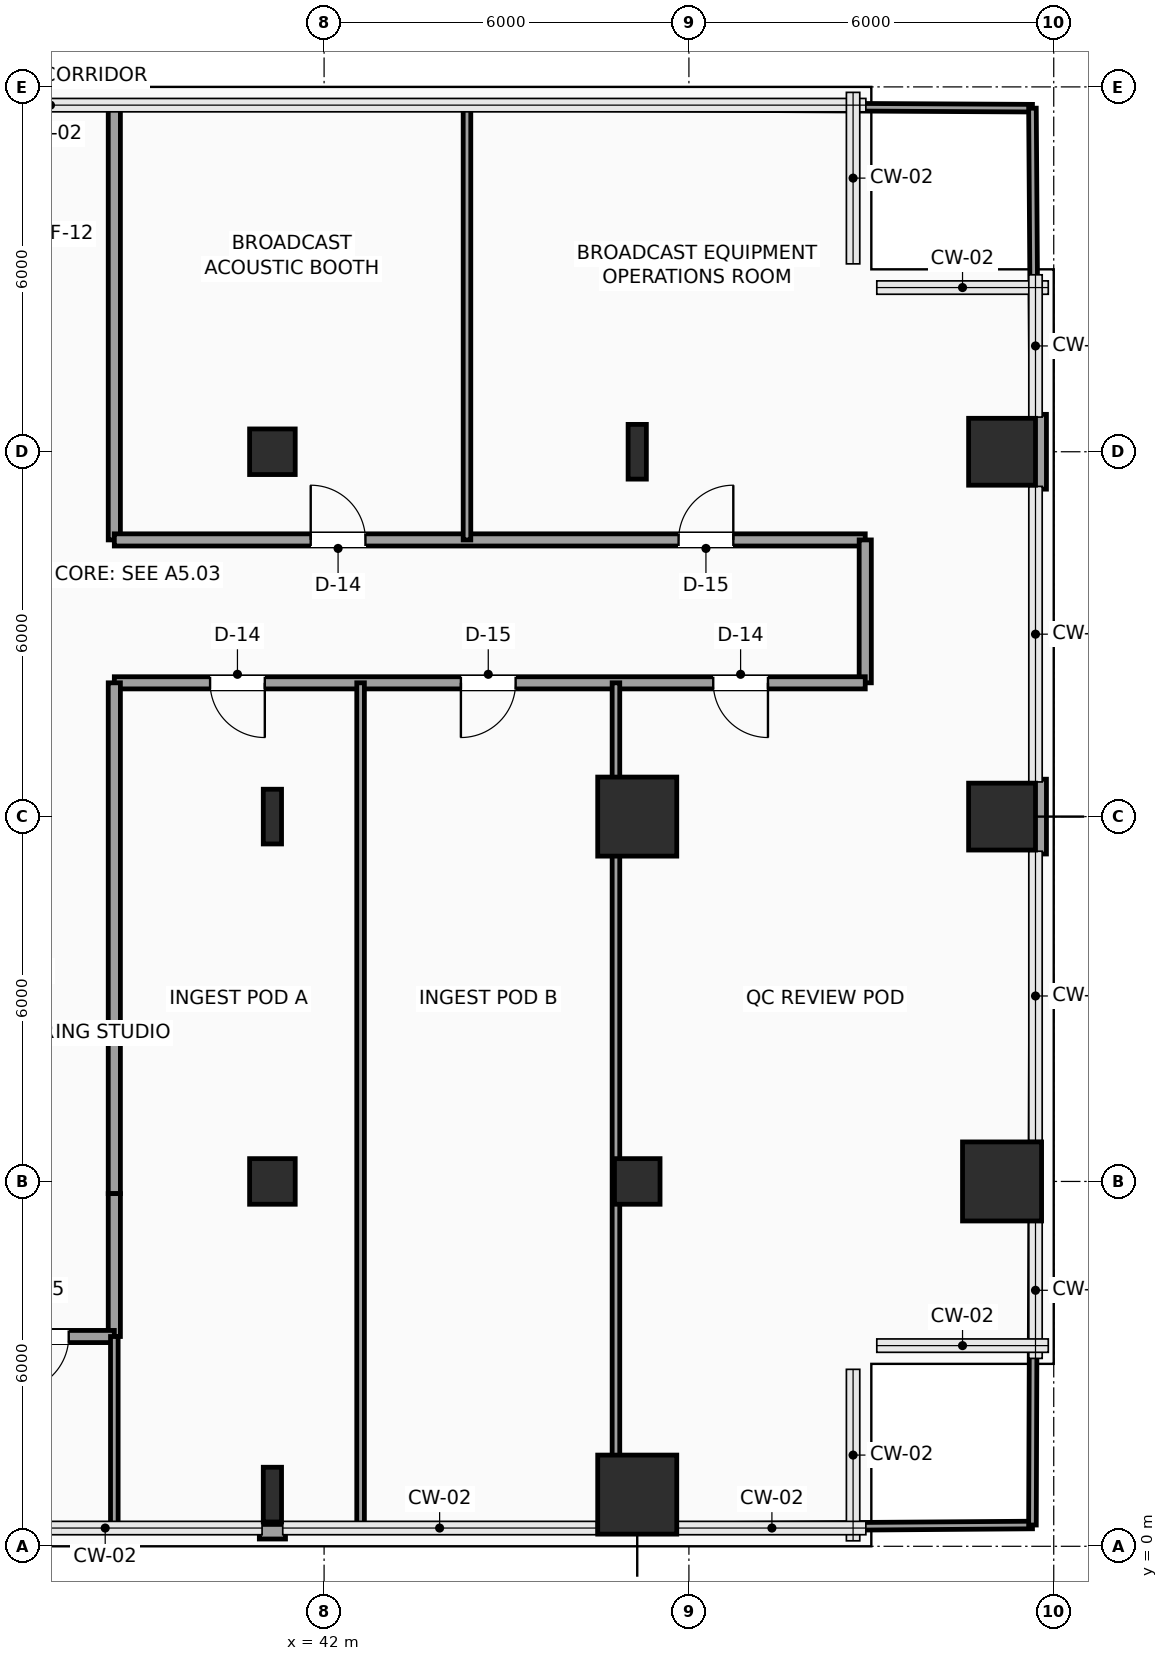
"""IFC4 building model, lengths in metres.
Left out: names, types, materials, properties, quantities, classifications, styles, units other than length and angle.
Written with IfcOpenShell. Run it as: python <this file> out.ifc"""

import sys

from ifc_helpers import new_model, si_unit, direction, frame, frame_2d, origin, origin_2d, place, context, subcontext, project, spatial, rectangle, hollow_rectangle, i_section, extrude, element, fill, save


model = new_model("IFC4")
c1 = context("Model", 3, precision=1e-05, world=origin(), true_north=direction((0.0, 1.0)))
c2 = subcontext(c1, "Body", "Model", "MODEL_VIEW")
j1 = project(units=[si_unit("LENGTHUNIT", "METRE"), si_unit("PLANEANGLEUNIT", "RADIAN")], contexts=[c1])
p1 = place(None, origin())
s1 = spatial("IfcSite", under=j1, at=p1, CompositionType="ELEMENT")
p2 = place(p1, origin())
s2 = spatial("IfcBuilding", under=s1, at=p2, CompositionType="ELEMENT")
p3 = place(p2, frame((0.0, 0.0, 51.9)))
s3 = spatial("IfcBuildingStorey", under=s2, at=p3, CompositionType="ELEMENT", Elevation=51.9)
p4 = place(p3, frame((41.15, 0.85, 0.0), z_axis=(0.0, 0.0, 1.0), x_axis=(1.0, 0.0, 0.0)))
e1 = element("IfcColumn", 1, at=p4, inside=s3, PredefinedType="COLUMN", context=c2, shape_type="SweptSolid", body=[
    extrude(i_section(OverallWidth=0.3, OverallDepth=0.9, WebThickness=0.019, FlangeThickness=0.035, FilletRadius=0.03, at=origin_2d()), origin(), (0.0, 0.0, 1.0), 3.9),
])
p5 = place(p3, frame((41.15, 6.0, 0.0), z_axis=(0.0, 0.0, 1.0), x_axis=(1.0, 0.0, 0.0)))
e2 = element("IfcColumn", 2, at=p5, inside=s3, PredefinedType="COLUMN", context=c2, shape_type="SweptSolid", body=[
    extrude(hollow_rectangle(XDim=0.75, YDim=0.75, WallThickness=0.035, InnerFilletRadius=0.035, OuterFilletRadius=0.05, at=origin_2d()), origin(), (0.0, 0.0, 1.0), 3.9),
])
p6 = place(p3, frame((41.15, 12.0, 0.0), z_axis=(0.0, 0.0, 1.0), x_axis=(1.0, 0.0, 0.0)))
e3 = element("IfcColumn", 3, at=p6, inside=s3, PredefinedType="COLUMN", context=c2, shape_type="SweptSolid", body=[
    extrude(i_section(OverallWidth=0.3, OverallDepth=0.9, WebThickness=0.019, FlangeThickness=0.035, FilletRadius=0.03, at=origin_2d()), origin(), (0.0, 0.0, 1.0), 3.9),
])
p7 = place(p3, frame((41.15, 18.0, 0.0), z_axis=(0.0, 0.0, 1.0), x_axis=(1.0, 0.0, 0.0)))
e4 = element("IfcColumn", 4, at=p7, inside=s3, PredefinedType="COLUMN", context=c2, shape_type="SweptSolid", body=[
    extrude(hollow_rectangle(XDim=0.75, YDim=0.75, WallThickness=0.035, InnerFilletRadius=0.035, OuterFilletRadius=0.05, at=origin_2d()), origin(), (0.0, 0.0, 1.0), 3.9),
])
p8 = place(p3, frame((47.15, 0.85, 0.0), z_axis=(0.0, 0.0, 1.0), x_axis=(1.0, 0.0, 0.0)))
e5 = element("IfcColumn", 5, at=p8, inside=s3, PredefinedType="COLUMN", context=c2, shape_type="SweptSolid", body=[
    extrude(rectangle(XDim=1.3, YDim=1.3, at=origin_2d()), origin(), (0.0, 0.0, 1.0), 3.9),
])
p9 = place(p3, frame((47.15, 6.0, 0.0), z_axis=(0.0, 0.0, 1.0), x_axis=(1.0, 0.0, 0.0)))
e6 = element("IfcColumn", 6, at=p9, inside=s3, PredefinedType="COLUMN", context=c2, shape_type="SweptSolid", body=[
    extrude(hollow_rectangle(XDim=0.75, YDim=0.75, WallThickness=0.035, InnerFilletRadius=0.035, OuterFilletRadius=0.05, at=origin_2d()), origin(), (0.0, 0.0, 1.0), 3.9),
])
p10 = place(p3, frame((47.15, 12.0, 0.0), z_axis=(0.0, 0.0, 1.0), x_axis=(1.0, 0.0, 0.0)))
e7 = element("IfcColumn", 7, at=p10, inside=s3, PredefinedType="COLUMN", context=c2, shape_type="SweptSolid", body=[
    extrude(rectangle(XDim=1.3, YDim=1.3, at=origin_2d()), origin(), (0.0, 0.0, 1.0), 3.9),
])
p11 = place(p3, frame((47.15, 18.0, 0.0), z_axis=(0.0, 0.0, 1.0), x_axis=(1.0, 0.0, 0.0)))
e8 = element("IfcColumn", 8, at=p11, inside=s3, PredefinedType="COLUMN", context=c2, shape_type="SweptSolid", body=[
    extrude(i_section(OverallWidth=0.3, OverallDepth=0.9, WebThickness=0.019, FlangeThickness=0.035, FilletRadius=0.03, at=origin_2d()), origin(), (0.0, 0.0, 1.0), 3.9),
])
p12 = place(p3, frame((53.15, 6.0, 0.0), z_axis=(0.0, 0.0, 1.0), x_axis=(1.0, 0.0, 0.0)))
e9 = element("IfcColumn", 9, at=p12, inside=s3, PredefinedType="COLUMN", context=c2, shape_type="SweptSolid", body=[
    extrude(rectangle(XDim=1.3, YDim=1.3, at=origin_2d()), origin(), (0.0, 0.0, 1.0), 3.9),
])
for number, where, z_axis, x_axis in (
    (10, (53.15, 12.0, 0.0), (0.0, 0.0, 1.0), (1.0, 0.0, 0.0)),
    (11, (53.15, 18.0, 0.0), (0.0, 0.0, 1.0), (1.0, 0.0, 0.0)),
):
    element("IfcColumn", number, at=place(p3, frame(where, z_axis=z_axis, x_axis=x_axis)), inside=s3, PredefinedType="COLUMN", context=c2, shape_type="SweptSolid", body=[
        extrude(rectangle(XDim=1.1, YDim=1.1, at=origin_2d()), origin(), (0.0, 0.0, 1.0), 3.9),
    ])
for number, where, z_axis, x_axis in (
    (12, (53.76, 18.615, 0.0), (0.0, 0.0, 1.0), (0.0, -1.0, 0.0)),
    (13, (53.76, 12.615, 0.0), (0.0, 0.0, 1.0), (0.0, -1.0, 0.0)),
):
    element("IfcWall", number, at=place(p3, frame(where, z_axis=z_axis, x_axis=x_axis)), inside=s3, PredefinedType="SOLIDWALL", context=c2, shape_type="SweptSolid", body=[
        extrude(rectangle(XDim=1.23, YDim=0.24, at=frame_2d((0.615, 0.0))), origin(), (0.0, 0.0, 1.0), 3.65),
    ])
p13 = place(p3, frame((41.365, 0.24, 0.0), z_axis=(0.0, 0.0, 1.0), x_axis=(-1.0, 0.0, 0.0)))
e14 = element("IfcWall", 14, at=p13, inside=s3, PredefinedType="SOLIDWALL", context=c2, shape_type="SweptSolid", body=[
    extrude(rectangle(XDim=0.43, YDim=0.24, at=frame_2d((0.215, 0.0))), origin(), (0.0, 0.0, 1.0), 3.65),
])
p14 = place(p3, frame((38.55, 23.7, 0.0), z_axis=(0.0, 0.0, 1.0), x_axis=(0.0, -1.0, 0.0)))
e15 = element("IfcWall", 15, at=p14, inside=s3, PredefinedType="PARTITIONING", context=c2, shape_type="SweptSolid", body=[
    extrude(rectangle(XDim=7.15, YDim=0.2, at=frame_2d((3.575, 0.0))), origin(), (0.0, 0.0, 1.0), 3.65),
])
p15 = place(p3, frame((38.55, 16.55, 0.0), z_axis=(0.0, 0.0, 1.0), x_axis=(1.0, 0.0, 0.0)))
e16 = element("IfcWall", 16, at=p15, inside=s3, PredefinedType="PARTITIONING", context=c2, shape_type="SweptSolid", body=[
    extrude(rectangle(XDim=12.35, YDim=0.2, at=frame_2d((6.175, 0.0))), origin(), (0.0, 0.0, 1.0), 3.65),
])
p16 = place(p15, frame((3.23, 0.0, 0.0)))
e17 = element("IfcOpeningElement", 17, at=p16, cuts=e16, PredefinedType="OPENING", context=c2, shape_type="SweptSolid", body=[
    extrude(rectangle(XDim=0.9, YDim=2.1, at=frame_2d((0.45, 1.05))), frame((0.0, 0.11, 0.0), z_axis=(0.0, -1.0, 0.0), x_axis=(1.0, 0.0, 0.0)), (0.0, 0.0, 1.0), 0.22),
])
p17 = place(p15, frame((9.28, 0.0, 0.0)))
e18 = element("IfcOpeningElement", 18, at=p17, cuts=e16, PredefinedType="OPENING", context=c2, shape_type="SweptSolid", body=[
    extrude(rectangle(XDim=0.9, YDim=2.1, at=frame_2d((0.45, 1.05))), frame((0.0, 0.11, 0.0), z_axis=(0.0, -1.0, 0.0), x_axis=(1.0, 0.0, 0.0)), (0.0, 0.0, 1.0), 0.22),
])
p18 = place(p3, frame((50.9, 16.55, 0.0), z_axis=(0.0, 0.0, 1.0), x_axis=(0.0, -1.0, 0.0)))
e19 = element("IfcWall", 19, at=p18, inside=s3, PredefinedType="PARTITIONING", context=c2, shape_type="SweptSolid", body=[
    extrude(rectangle(XDim=2.35, YDim=0.2, at=frame_2d((1.175, 0.0))), origin(), (0.0, 0.0, 1.0), 3.65),
])
p19 = place(p3, frame((50.9, 14.2, 0.0), z_axis=(0.0, 0.0, 1.0), x_axis=(-1.0, 0.0, 0.0)))
e20 = element("IfcWall", 20, at=p19, inside=s3, PredefinedType="PARTITIONING", context=c2, shape_type="SweptSolid", body=[
    extrude(rectangle(XDim=12.35, YDim=0.2, at=frame_2d((6.175, 0.0))), origin(), (0.0, 0.0, 1.0), 3.65),
])
p20 = place(p19, frame((9.875, 0.0, 0.0)))
e21 = element("IfcOpeningElement", 21, at=p20, cuts=e20, PredefinedType="OPENING", context=c2, shape_type="SweptSolid", body=[
    extrude(rectangle(XDim=0.9, YDim=2.1, at=frame_2d((0.45, 1.05))), frame((0.0, 0.11, 0.0), z_axis=(0.0, -1.0, 0.0), x_axis=(1.0, 0.0, 0.0)), (0.0, 0.0, 1.0), 0.22),
])
p21 = place(p19, frame((5.75, 0.0, 0.0)))
e22 = element("IfcOpeningElement", 22, at=p21, cuts=e20, PredefinedType="OPENING", context=c2, shape_type="SweptSolid", body=[
    extrude(rectangle(XDim=0.9, YDim=2.1, at=frame_2d((0.45, 1.05))), frame((0.0, 0.11, 0.0), z_axis=(0.0, -1.0, 0.0), x_axis=(1.0, 0.0, 0.0)), (0.0, 0.0, 1.0), 0.22),
])
p22 = place(p19, frame((1.6, 0.0, 0.0)))
e23 = element("IfcOpeningElement", 23, at=p22, cuts=e20, PredefinedType="OPENING", context=c2, shape_type="SweptSolid", body=[
    extrude(rectangle(XDim=0.9, YDim=2.1, at=frame_2d((0.45, 1.05))), frame((0.0, 0.11, 0.0), z_axis=(0.0, -1.0, 0.0), x_axis=(1.0, 0.0, 0.0)), (0.0, 0.0, 1.0), 0.22),
])
p23 = place(p3, frame((38.55, 14.2, 0.0), z_axis=(0.0, 0.0, 1.0), x_axis=(0.0, -1.0, 0.0)))
e24 = element("IfcWall", 24, at=p23, inside=s3, PredefinedType="PARTITIONING", context=c2, shape_type="SweptSolid", body=[
    extrude(rectangle(XDim=8.4, YDim=0.2, at=frame_2d((4.2, 0.0))), origin(), (0.0, 0.0, 1.0), 3.65),
])
p24 = place(p3, frame((38.55, 5.8, 0.0), z_axis=(0.0, 0.0, 1.0), x_axis=(0.0, -1.0, 0.0)))
e25 = element("IfcWall", 25, at=p24, inside=s3, PredefinedType="PARTITIONING", context=c2, shape_type="SweptSolid", body=[
    extrude(rectangle(XDim=2.35, YDim=0.2, at=frame_2d((1.175, 0.0))), origin(), (0.0, 0.0, 1.0), 3.65),
])
p25 = place(p3, frame((38.55, 3.45, 0.0), z_axis=(0.0, 0.0, 1.0), x_axis=(-1.0, 0.0, 0.0)))
e26 = element("IfcWall", 26, at=p25, inside=s3, PredefinedType="PARTITIONING", context=c2, shape_type="SweptSolid", body=[
    extrude(rectangle(XDim=2.4, YDim=0.2, at=frame_2d((1.2, 0.0))), origin(), (0.0, 0.0, 1.0), 3.142),
])
p26 = place(p25, frame((0.75, 0.0, 0.0)))
e27 = element("IfcOpeningElement", 27, at=p26, cuts=e26, PredefinedType="OPENING", context=c2, shape_type="SweptSolid", body=[
    extrude(rectangle(XDim=0.9, YDim=2.1, at=frame_2d((0.45, 1.05))), frame((0.0, 0.11, 0.0), z_axis=(0.0, -1.0, 0.0), x_axis=(1.0, 0.0, 0.0)), (0.0, 0.0, 1.0), 0.22),
])
for number, where, z_axis, x_axis in (
    (28, (42.6, 0.3, 0.0), (0.0, 0.0, 1.0), (0.0, 1.0, 0.0)),
    (29, (46.8, 0.3, 0.0), (0.0, 0.0, 1.0), (0.0, 1.0, 0.0)),
):
    element("IfcWall", number, at=place(p3, frame(where, z_axis=z_axis, x_axis=x_axis)), inside=s3, PredefinedType="PARTITIONING", context=c2, shape_type="SweptSolid", body=[
        extrude(rectangle(XDim=13.9, YDim=0.125, at=frame_2d((6.95, 0.0))), origin(), (0.0, 0.0, 1.0), 3.65),
    ])
p27 = place(p3, frame((46.8, 0.3, 0.0), z_axis=(0.0, 0.0, 1.0), x_axis=(0.999973308199, 0.007306359489, 0.0)))
e30 = element("IfcWall", 30, at=p27, inside=s3, PredefinedType="PARTITIONING", context=c2, shape_type="SweptSolid", body=[
    extrude(rectangle(XDim=6.85, YDim=0.125, at=frame_2d((3.425, 0.0))), origin(), (0.0, 0.0, 1.0), 3.65),
])
p28 = place(p3, frame((53.65, 0.35, 0.0), z_axis=(0.0, 0.0, 1.0), x_axis=(0.003606251025, 0.999993497456, 0.0)))
e31 = element("IfcWall", 31, at=p28, inside=s3, PredefinedType="PARTITIONING", context=c2, shape_type="SweptSolid", body=[
    extrude(rectangle(XDim=11.035, YDim=0.125, at=frame_2d((5.518, 0.0))), origin(), (0.0, 0.0, 1.0), 3.65),
])
p29 = place(p3, frame((53.694, 12.615, 0.0), z_axis=(0.0, 0.0, 1.0), x_axis=(0.003542799701, 0.999993724265, 0.0)))
e32 = element("IfcWall", 32, at=p29, inside=s3, PredefinedType="PARTITIONING", context=c2, shape_type="SweptSolid", body=[
    extrude(rectangle(XDim=1.585, YDim=0.125, at=frame_2d((0.792, 0.0))), origin(), (0.0, 0.0, 1.0), 3.65),
])
p30 = place(p3, frame((44.35, 16.55, 0.0), z_axis=(0.0, 0.0, 1.0), x_axis=(0.0, 1.0, 0.0)))
e33 = element("IfcWall", 33, at=p30, inside=s3, PredefinedType="PARTITIONING", context=c2, shape_type="SweptSolid", body=[
    extrude(rectangle(XDim=7.15, YDim=0.125, at=frame_2d((3.575, 0.0))), origin(), (0.0, 0.0, 1.0), 3.65),
])
p31 = place(p3, frame((44.35, 23.7, 0.0), z_axis=(0.0, 0.0, 1.0), x_axis=(0.999985518927, -0.005381629512, 0.0)))
e34 = element("IfcWall", 34, at=p31, inside=s3, PredefinedType="PARTITIONING", context=c2, shape_type="SweptSolid", body=[
    extrude(rectangle(XDim=9.3, YDim=0.125, at=frame_2d((4.65, 0.0))), origin(), (0.0, 0.0, 1.0), 3.65),
])
p32 = place(p3, frame((53.7, 16.55, 0.0), z_axis=(0.0, 0.0, 1.0), x_axis=(-0.007017371073, 0.999975377948, 0.0)))
e35 = element("IfcWall", 35, at=p32, inside=s3, PredefinedType="PARTITIONING", context=c2, shape_type="SweptSolid", body=[
    extrude(rectangle(XDim=0.835, YDim=0.125, at=frame_2d((0.417, 0.0))), origin(), (0.0, 0.0, 1.0), 3.65),
])
p33 = place(p3, frame((53.686, 18.615, 0.0), z_axis=(0.0, 0.0, 1.0), x_axis=(-0.007079296972, 0.999974941463, 0.0)))
e36 = element("IfcWall", 36, at=p33, inside=s3, PredefinedType="PARTITIONING", context=c2, shape_type="SweptSolid", body=[
    extrude(rectangle(XDim=5.035, YDim=0.125, at=frame_2d((2.518, 0.0))), origin(), (0.0, 0.0, 1.0), 3.65),
])
p34 = place(p3, frame((38.55, 0.3, 0.0), z_axis=(0.0, 0.0, 1.0), x_axis=(0.0, 1.0, 0.0)))
e37 = element("IfcWall", 37, at=p34, inside=s3, PredefinedType="PARTITIONING", context=c2, shape_type="SweptSolid", body=[
    extrude(rectangle(XDim=3.15, YDim=0.125, at=frame_2d((1.575, 0.0))), origin(), (0.0, 0.0, 1.0), 3.65),
])
p35 = place(p16, origin())
e38 = element("IfcDoor", 38, at=p35, inside=s3, OperationType="SINGLE_SWING_LEFT", PredefinedType="DOOR", context=c2, shape_type="SweptSolid", body=[
    extrude(rectangle(XDim=0.9, YDim=2.1, at=frame_2d((0.45, 1.05))), frame((0.0, 0.025, 0.0), z_axis=(0.0, -1.0, 0.0), x_axis=(1.0, 0.0, 0.0)), (0.0, 0.0, 1.0), 0.05),
])
fill(e17, e38)
p36 = place(p17, origin())
e39 = element("IfcDoor", 39, at=p36, inside=s3, OperationType="SINGLE_SWING_RIGHT", PredefinedType="DOOR", context=c2, shape_type="SweptSolid", body=[
    extrude(rectangle(XDim=0.9, YDim=2.1, at=frame_2d((0.45, 1.05))), frame((0.0, 0.025, 0.0), z_axis=(0.0, -1.0, 0.0), x_axis=(1.0, 0.0, 0.0)), (0.0, 0.0, 1.0), 0.05),
])
fill(e18, e39)
p37 = place(p20, origin())
e40 = element("IfcDoor", 40, at=p37, inside=s3, OperationType="SINGLE_SWING_LEFT", PredefinedType="DOOR", context=c2, shape_type="SweptSolid", body=[
    extrude(rectangle(XDim=0.9, YDim=2.1, at=frame_2d((0.45, 1.05))), frame((0.0, 0.025, 0.0), z_axis=(0.0, -1.0, 0.0), x_axis=(1.0, 0.0, 0.0)), (0.0, 0.0, 1.0), 0.05),
])
fill(e21, e40)
p38 = place(p21, origin())
e41 = element("IfcDoor", 41, at=p38, inside=s3, OperationType="SINGLE_SWING_RIGHT", PredefinedType="DOOR", context=c2, shape_type="SweptSolid", body=[
    extrude(rectangle(XDim=0.9, YDim=2.1, at=frame_2d((0.45, 1.05))), frame((0.0, 0.025, 0.0), z_axis=(0.0, -1.0, 0.0), x_axis=(1.0, 0.0, 0.0)), (0.0, 0.0, 1.0), 0.05),
])
fill(e22, e41)
p39 = place(p22, origin())
e42 = element("IfcDoor", 42, at=p39, inside=s3, OperationType="SINGLE_SWING_LEFT", PredefinedType="DOOR", context=c2, shape_type="SweptSolid", body=[
    extrude(rectangle(XDim=0.9, YDim=2.1, at=frame_2d((0.45, 1.05))), frame((0.0, 0.025, 0.0), z_axis=(0.0, -1.0, 0.0), x_axis=(1.0, 0.0, 0.0)), (0.0, 0.0, 1.0), 0.05),
])
fill(e23, e42)
p40 = place(p26, origin())
e43 = element("IfcDoor", 43, at=p40, inside=s3, OperationType="SINGLE_SWING_RIGHT", PredefinedType="DOOR", context=c2, shape_type="SweptSolid", body=[
    extrude(rectangle(XDim=0.9, YDim=2.1, at=frame_2d((0.45, 1.05))), frame((0.0, 0.025, 0.0), z_axis=(0.0, -1.0, 0.0), x_axis=(1.0, 0.0, 0.0)), (0.0, 0.0, 1.0), 0.05),
])
fill(e27, e43)
save(model, sys.argv[1])
